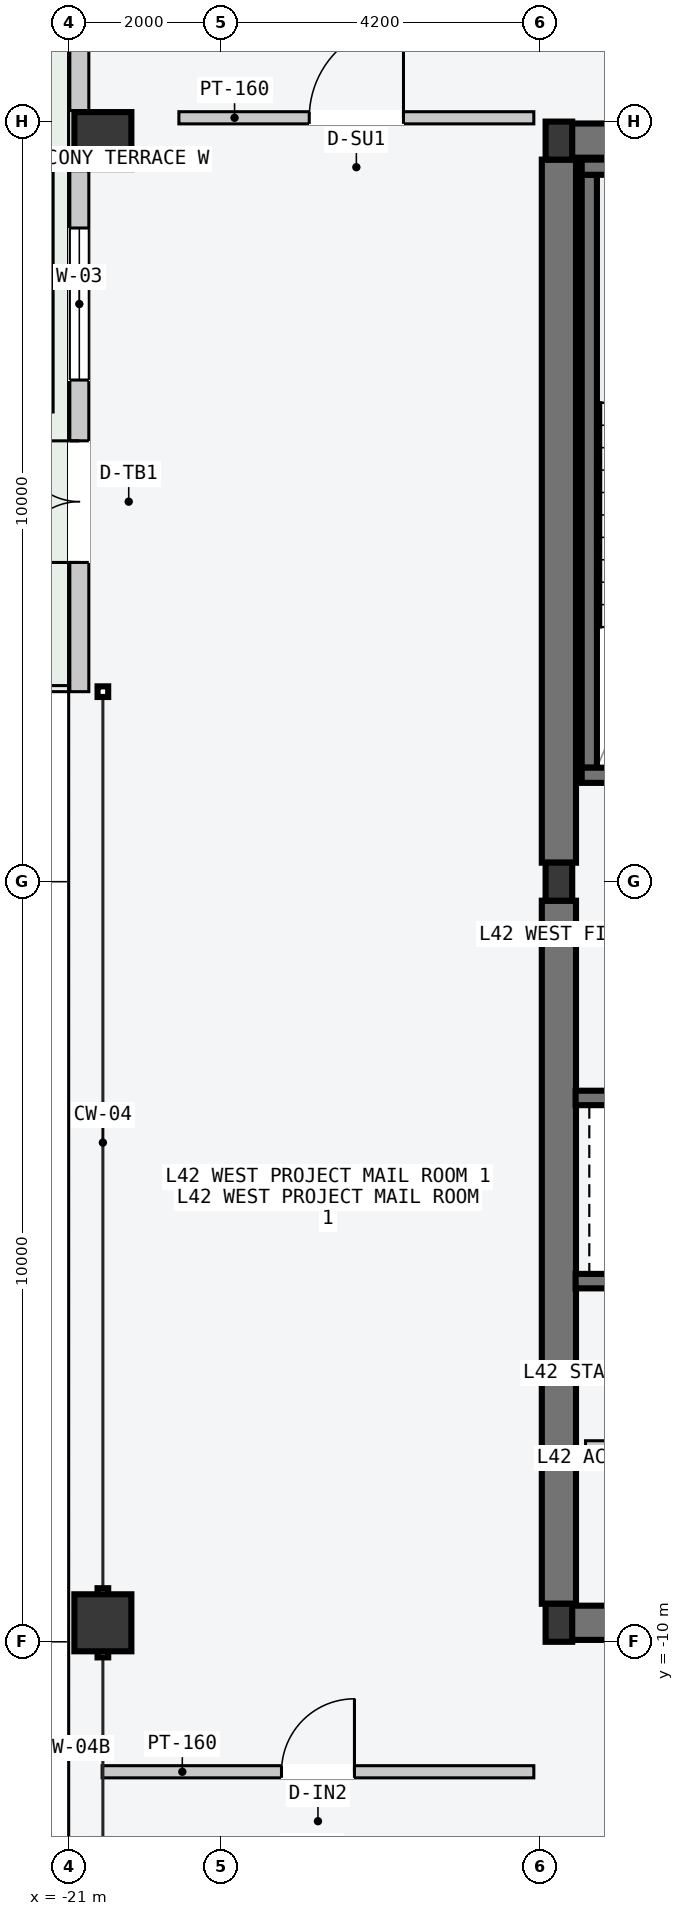
"""IFC4 building model, lengths in metres.
Left out: names, types, materials, properties, quantities, classifications, styles, units other than length and angle.
Written with IfcOpenShell. Run it as: python <this file> out.ifc"""

import sys

from ifc_helpers import new_model, si_unit, direction, frame, frame_2d, origin, origin_2d, place, context, subcontext, project, spatial, rectangle, hollow_rectangle, i_section, extrude, element, fill, save


model = new_model("IFC4")
c1 = context("Model", 3, precision=1e-05, world=origin(), true_north=direction((0.0, 1.0)))
c2 = subcontext(c1, "Body", "Model", "MODEL_VIEW")
j1 = project(units=[si_unit("LENGTHUNIT", "METRE"), si_unit("PLANEANGLEUNIT", "RADIAN")], contexts=[c1])
p1 = place(None, origin())
s1 = spatial("IfcSite", under=j1, at=p1, CompositionType="ELEMENT")
p2 = place(p1, origin())
s2 = spatial("IfcBuilding", under=s1, at=p2, CompositionType="ELEMENT")
p3 = place(p2, frame((0.0, 0.0, 162.3)))
s3 = spatial("IfcBuildingStorey", under=s2, at=p3, CompositionType="ELEMENT", Elevation=162.3)
for number, where, z_axis, x_axis in (
    (1, (-14.53, -9.75, -0.2), (0.0, 0.0, 1.0), (1.0, 0.0, 0.0)),
    (2, (-14.53, 9.75, -0.2), (0.0, 0.0, 1.0), (1.0, 0.0, 0.0)),
):
    element("IfcWall", number, at=place(p3, frame(where, z_axis=z_axis, x_axis=x_axis)), inside=s3, PredefinedType="SHEAR", context=c2, shape_type="SweptSolid", body=[
        extrude(rectangle(XDim=6.46, YDim=0.45, at=frame_2d((3.23, 0.0))), origin(), (0.0, 0.0, 1.0), 3.6),
    ])
for number, where, z_axis, x_axis in (
    (3, (-14.55, -9.5, -0.2), (0.0, 0.0, 1.0), (0.0, 1.0, 0.0)),
    (4, (-14.55, 0.25, -0.2), (0.0, 0.0, 1.0), (0.0, 1.0, 0.0)),
):
    element("IfcWall", number, at=place(p3, frame(where, z_axis=z_axis, x_axis=x_axis)), inside=s3, PredefinedType="SHEAR", context=c2, shape_type="SweptSolid", body=[
        extrude(rectangle(XDim=9.25, YDim=0.45, at=frame_2d((4.625, 0.0))), origin(), (0.0, 0.0, 1.0), 3.6),
    ])
p4 = place(p3, frame((-14.15, 1.5, -0.2), z_axis=(0.0, 0.0, 1.0), x_axis=(0.0, 1.0, 0.0)))
e5 = element("IfcWall", 5, at=p4, inside=s3, PredefinedType="SOLIDWALL", context=c2, shape_type="SweptSolid", body=[
    extrude(rectangle(XDim=7.8, YDim=0.2, at=frame_2d((3.9, 0.0))), origin(), (0.0, 0.0, 1.0), 3.6),
])
p5 = place(p3, frame((-14.25, 1.4, -0.2), z_axis=(0.0, 0.0, 1.0), x_axis=(1.0, 0.0, 0.0)))
e6 = element("IfcWall", 6, at=p5, inside=s3, PredefinedType="SOLIDWALL", context=c2, shape_type="SweptSolid", body=[
    extrude(rectangle(XDim=3.72, YDim=0.2, at=frame_2d((1.86, 0.0))), origin(), (0.0, 0.0, 1.0), 3.6),
])
p6 = place(p5, frame((1.5, 0.0, 0.2)))
e7 = element("IfcOpeningElement", 7, at=p6, cuts=e6, PredefinedType="OPENING", context=c2, shape_type="SweptSolid", body=[
    extrude(rectangle(XDim=1.12, YDim=2.18, at=frame_2d((0.56, 1.09))), frame((0.0, 0.11, 0.0), z_axis=(0.0, -1.0, 0.0), x_axis=(1.0, 0.0, 0.0)), (0.0, 0.0, 1.0), 0.22),
])
p7 = place(p3, frame((-14.25, 9.4, -0.2), z_axis=(0.0, 0.0, 1.0), x_axis=(1.0, 0.0, 0.0)))
e8 = element("IfcWall", 8, at=p7, inside=s3, PredefinedType="SOLIDWALL", context=c2, shape_type="SweptSolid", body=[
    extrude(rectangle(XDim=3.72, YDim=0.2, at=frame_2d((1.86, 0.0))), origin(), (0.0, 0.0, 1.0), 3.6),
])
for number, where, z_axis, x_axis in (
    (9, (-14.55, -9.75, 0.0), (0.0, 0.0, 1.0), (1.0, 0.0, 0.0)),
    (10, (-14.55, 0.0, 0.0), (0.0, 0.0, 1.0), (1.0, 0.0, 0.0)),
    (11, (-14.55, 9.75, 0.0), (0.0, 0.0, 1.0), (1.0, 0.0, 0.0)),
):
    element("IfcColumn", number, at=place(p3, frame(where, z_axis=z_axis, x_axis=x_axis)), inside=s3, PredefinedType="COLUMN", context=c2, shape_type="SweptSolid", body=[
        extrude(i_section(OverallWidth=0.35, OverallDepth=0.5, WebThickness=0.02, FlangeThickness=0.032, at=origin_2d()), origin(), (0.0, 0.0, 1.0), 3.6),
    ])
for number, where, z_axis, x_axis in (
    (12, (-20.55, -9.75, 0.0), (0.0, 0.0, 1.0), (0.0, 1.0, 0.0)),
    (13, (-20.55, 9.75, 0.0), (0.0, 0.0, 1.0), (0.0, 1.0, 0.0)),
):
    element("IfcColumn", number, at=place(p3, frame(where, z_axis=z_axis, x_axis=x_axis)), inside=s3, PredefinedType="COLUMN", context=c2, shape_type="SweptSolid", body=[
        extrude(hollow_rectangle(XDim=0.75, YDim=0.75, WallThickness=0.032, at=origin_2d()), origin(), (0.0, 0.0, 1.0), 3.6),
    ])
p8 = place(p3, frame((-20.86, 2.5, 0.0), z_axis=(0.0, 0.0, 1.0), x_axis=(0.0, 1.0, 0.0)))
e14 = element("IfcWall", 14, at=p8, inside=s3, PredefinedType="STANDARD", context=c2, shape_type="SweptSolid", body=[
    extrude(rectangle(XDim=6.855, YDim=0.25, at=frame_2d((3.427, 0.0))), origin(), (0.0, 0.0, 1.0), 3.4),
])
p9 = place(p8, frame((1.7, 0.0, 0.0)))
e15 = element("IfcOpeningElement", 15, at=p9, cuts=e14, PredefinedType="OPENING", context=c2, shape_type="SweptSolid", body=[
    extrude(rectangle(XDim=1.6, YDim=2.2, at=frame_2d((0.8, 1.1))), frame((0.0, 0.135, 0.0), z_axis=(0.0, -1.0, 0.0), x_axis=(1.0, 0.0, 0.0)), (0.0, 0.0, 1.0), 0.27),
])
p10 = place(p8, frame((4.1, 0.0, 0.85)))
e16 = element("IfcOpeningElement", 16, at=p10, cuts=e14, PredefinedType="OPENING", context=c2, shape_type="SweptSolid", body=[
    extrude(rectangle(XDim=2.0, YDim=2.1, at=frame_2d((1.0, 1.05))), frame((0.0, 0.135, 0.0), z_axis=(0.0, -1.0, 0.0), x_axis=(1.0, 0.0, 0.0)), (0.0, 0.0, 1.0), 0.27),
])
p11 = place(p3, frame((-20.86, 10.145, 0.0), z_axis=(0.0, 0.0, 1.0), x_axis=(0.0, 1.0, 0.0)))
e17 = element("IfcWall", 17, at=p11, inside=s3, PredefinedType="STANDARD", context=c2, shape_type="SweptSolid", body=[
    extrude(rectangle(XDim=2.51, YDim=0.25, at=frame_2d((1.255, 0.0))), origin(), (0.0, 0.0, 1.0), 3.4),
])
p12 = place(p3, frame((-14.33, -2.845, -0.2), z_axis=(0.0, 0.0, 1.0), x_axis=(1.0, 0.0, 0.0)))
e18 = element("IfcWall", 18, at=p12, inside=s3, PredefinedType="SOLIDWALL", context=c2, shape_type="SweptSolid", body=[
    extrude(rectangle(XDim=2.68, YDim=0.19, at=frame_2d((1.34, 0.0))), origin(), (0.0, 0.0, 1.0), 3.6),
])
p13 = place(p12, frame((0.83, 0.0, 0.2)))
e19 = element("IfcOpeningElement", 19, at=p13, cuts=e18, PredefinedType="OPENING", context=c2, shape_type="SweptSolid", body=[
    extrude(rectangle(XDim=1.2, YDim=2.2, at=frame_2d((0.6, 1.1))), frame((0.0, 0.105, 0.0), z_axis=(0.0, -1.0, 0.0), x_axis=(1.0, 0.0, 0.0)), (0.0, 0.0, 1.0), 0.21),
])
p14 = place(p3, frame((-14.33, -5.255, -0.2), z_axis=(0.0, 0.0, 1.0), x_axis=(1.0, 0.0, 0.0)))
e20 = element("IfcWall", 20, at=p14, inside=s3, PredefinedType="SOLIDWALL", context=c2, shape_type="SweptSolid", body=[
    extrude(rectangle(XDim=2.68, YDim=0.19, at=frame_2d((1.34, 0.0))), origin(), (0.0, 0.0, 1.0), 3.6),
])
p15 = place(p3, frame((-11.7, -7.425, 0.0), z_axis=(0.0, 0.0, 1.0), x_axis=(-1.0, 0.0, 0.0)))
e21 = element("IfcWall", 21, at=p15, inside=s3, PredefinedType="PARTITIONING", context=c2, shape_type="SweptSolid", body=[
    extrude(rectangle(XDim=2.5, YDim=0.14, at=frame_2d((1.25, 0.0))), origin(), (0.0, 0.0, 1.0), 3.4),
])
p16 = place(p3, frame((-19.55, 10.05, 0.0), z_axis=(0.0, 0.0, 1.0), x_axis=(1.0, 0.0, 0.0)))
e22 = element("IfcWall", 22, at=p16, inside=s3, PredefinedType="PARTITIONING", context=c2, shape_type="SweptSolid", body=[
    extrude(rectangle(XDim=4.67, YDim=0.16, at=frame_2d((2.335, 0.0))), origin(), (0.0, 0.0, 1.0), 3.4),
])
p17 = place(p16, frame((1.715, 0.0, 0.0)))
e23 = element("IfcOpeningElement", 23, at=p17, cuts=e22, PredefinedType="OPENING", context=c2, shape_type="SweptSolid", body=[
    extrude(rectangle(XDim=1.24, YDim=2.24, at=frame_2d((0.62, 1.12))), frame((0.0, 0.09, 0.0), z_axis=(0.0, -1.0, 0.0), x_axis=(1.0, 0.0, 0.0)), (0.0, 0.0, 1.0), 0.18),
])
p18 = place(p3, frame((-20.56, -11.71, 0.0), z_axis=(0.0, 0.0, 1.0), x_axis=(1.0, 0.0, 0.0)))
e24 = element("IfcWall", 24, at=p18, inside=s3, PredefinedType="PARTITIONING", context=c2, shape_type="SweptSolid", body=[
    extrude(rectangle(XDim=5.68, YDim=0.16, at=frame_2d((2.84, 0.0))), origin(), (0.0, 0.0, 1.0), 3.4),
])
p19 = place(p18, frame((2.36, 0.0, 0.0)))
e25 = element("IfcOpeningElement", 25, at=p19, cuts=e24, PredefinedType="OPENING", context=c2, shape_type="SweptSolid", body=[
    extrude(rectangle(XDim=0.96, YDim=2.18, at=frame_2d((0.48, 1.09))), frame((0.0, 0.09, 0.0), z_axis=(0.0, -1.0, 0.0), x_axis=(1.0, 0.0, 0.0)), (0.0, 0.0, 1.0), 0.18),
])
p20 = place(p9, origin())
e26 = element("IfcDoor", 26, at=p20, inside=s3, OperationType="DOUBLE_DOOR_SINGLE_SWING", PredefinedType="DOOR", context=c2, shape_type="SweptSolid", body=[
    extrude(rectangle(XDim=1.6, YDim=2.2, at=frame_2d((0.8, 1.1))), frame((0.0, 0.025, 0.0), z_axis=(0.0, -1.0, 0.0), x_axis=(1.0, 0.0, 0.0)), (0.0, 0.0, 1.0), 0.05),
])
fill(e15, e26)
p21 = place(p10, origin())
e27 = element("IfcWindow", 27, at=p21, inside=s3, PartitioningType="SINGLE_PANEL", PredefinedType="WINDOW", context=c2, shape_type="SweptSolid", body=[
    extrude(rectangle(XDim=2.0, YDim=2.1, at=frame_2d((1.0, 1.05))), frame((0.0, 0.03, 0.0), z_axis=(0.0, -1.0, 0.0), x_axis=(1.0, 0.0, 0.0)), (0.0, 0.0, 1.0), 0.06),
])
fill(e16, e27)
p22 = place(p17, origin())
e28 = element("IfcDoor", 28, at=p22, inside=s3, OperationType="SINGLE_SWING_RIGHT", PredefinedType="DOOR", context=c2, shape_type="SweptSolid", body=[
    extrude(rectangle(XDim=1.24, YDim=2.24, at=frame_2d((0.62, 1.12))), frame((0.0, 0.025, 0.0), z_axis=(0.0, -1.0, 0.0), x_axis=(1.0, 0.0, 0.0)), (0.0, 0.0, 1.0), 0.05),
])
fill(e23, e28)
p23 = place(p19, origin())
e29 = element("IfcDoor", 29, at=p23, inside=s3, OperationType="SINGLE_SWING_RIGHT", PredefinedType="DOOR", context=c2, shape_type="SweptSolid", body=[
    extrude(rectangle(XDim=0.96, YDim=2.18, at=frame_2d((0.48, 1.09))), frame((0.0, 0.025, 0.0), z_axis=(0.0, -1.0, 0.0), x_axis=(1.0, 0.0, 0.0)), (0.0, 0.0, 1.0), 0.05),
])
fill(e25, e29)
save(model, sys.argv[1])
